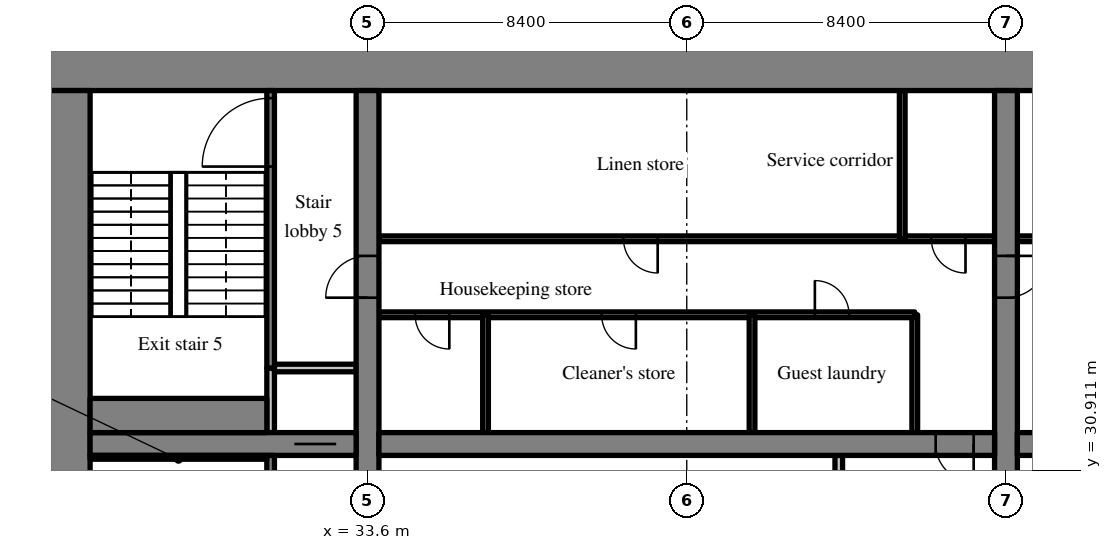
"""IFC4 building model, lengths in metres.
Left out: names, types, materials, properties, quantities, classifications, styles, units other than length and angle.
Written with IfcOpenShell. Run it as: python <this file> out.ifc"""

import sys

from ifc_helpers import new_model, si_unit, direction, frame, frame_2d, origin, place, context, subcontext, project, spatial, rectangle, extrude, source, transform, mapped, element, fill, save


model = new_model("IFC4")
c1 = context("Model", 3, precision=1e-05, world=origin(), true_north=direction((0.0, 1.0)))
c2 = subcontext(c1, "Body", "Model", "MODEL_VIEW")
j1 = project(units=[si_unit("LENGTHUNIT", "METRE"), si_unit("PLANEANGLEUNIT", "RADIAN")], contexts=[c1])
p1 = place(None, origin())
s1 = spatial("IfcSite", under=j1, at=p1, CompositionType="ELEMENT")
p2 = place(p1, origin())
s2 = spatial("IfcBuilding", under=s1, at=p2, CompositionType="ELEMENT")
p3 = place(p2, frame((0.0, 0.0, 39.2)))
s3 = spatial("IfcBuildingStorey", under=s2, at=p3, CompositionType="ELEMENT", Elevation=39.2)
m1 = source(origin(), c2, "Body", "SweptSolid", [
    extrude(rectangle(XDim=50.4, YDim=1.1, at=frame_2d((25.2, 0.0))), origin(), (0.0, 0.0, 1.0), 3.52),
])
p4 = place(p3, frame((25.2, 41.45, 0.0), z_axis=(0.0, 0.0, 1.0), x_axis=(1.0, 0.0, 0.0)))
e1 = element("IfcWall", 1, at=p4, inside=s3, PredefinedType="SHEAR", context=c2, shape_type="MappedRepresentation", body=[
    mapped(m1, transform((0.0, 0.0, 0.0), scale=1.0)),
])
m2 = source(origin(), c2, "Body", "SweptSolid", [
    extrude(rectangle(XDim=17.8, YDim=1.1, at=frame_2d((8.9, 0.0))), origin(), (0.0, 0.0, 1.0), 3.52),
])
p5 = place(p3, frame((25.75, 23.1, 0.0), z_axis=(0.0, 0.0, 1.0), x_axis=(0.0, 1.0, 0.0)))
e2 = element("IfcWall", 2, at=p5, inside=s3, PredefinedType="SHEAR", context=c2, shape_type="MappedRepresentation", body=[
    mapped(m2, transform((0.0, 0.0, 0.0), scale=1.0)),
])
m3 = source(origin(), c2, "Body", "SweptSolid", [
    extrude(rectangle(XDim=17.8, YDim=0.6, at=frame_2d((8.9, 0.0))), origin(), (0.0, 0.0, 1.0), 3.52),
])
p6 = place(p3, frame((33.6, 23.1, 0.0), z_axis=(0.0, 0.0, 1.0), x_axis=(0.0, 1.0, 0.0)))
e3 = element("IfcWall", 3, at=p6, inside=s3, PredefinedType="SHEAR", context=c2, shape_type="MappedRepresentation", body=[
    mapped(m3, transform((0.0, 0.0, 0.0), scale=1.0)),
])
m4 = source(origin(), c2, "Body", "SweptSolid", [
    extrude(rectangle(XDim=1.1, YDim=2.1, at=frame_2d((0.55, 1.05))), frame((0.0, 0.31, 0.0), z_axis=(0.0, -1.0, 0.0), x_axis=(1.0, 0.0, 0.0)), (0.0, 0.0, 1.0), 0.62),
])
p7 = place(p6, frame((12.35, 0.0, 0.0)))
e4 = element("IfcOpeningElement", 4, at=p7, cuts=e3, PredefinedType="OPENING", context=c2, shape_type="MappedRepresentation", body=[
    mapped(m4, transform((0.0, 0.0, 0.0), scale=1.0)),
])
p8 = place(p3, frame((50.4, 23.1, 0.0), z_axis=(0.0, 0.0, 1.0), x_axis=(0.0, 1.0, 0.0)))
e5 = element("IfcWall", 5, at=p8, inside=s3, PredefinedType="SHEAR", context=c2, shape_type="MappedRepresentation", body=[
    mapped(m3, transform((0.0, 0.0, 0.0), scale=1.0)),
])
p9 = place(p8, frame((12.35, 0.0, 0.0)))
e6 = element("IfcOpeningElement", 6, at=p9, cuts=e5, PredefinedType="OPENING", context=c2, shape_type="MappedRepresentation", body=[
    mapped(m4, transform((0.0, 0.0, 0.0), scale=1.0)),
])
m5 = source(origin(), c2, "Body", "SweptSolid", [
    extrude(rectangle(XDim=7.0, YDim=0.6, at=frame_2d((3.5, 0.0))), origin(), (0.0, 0.0, 1.0), 3.52),
])
p10 = place(p3, frame((26.3, 31.6, 0.0), z_axis=(0.0, 0.0, 1.0), x_axis=(1.0, 0.0, 0.0)))
e7 = element("IfcWall", 7, at=p10, inside=s3, PredefinedType="SHEAR", context=c2, shape_type="MappedRepresentation", body=[
    mapped(m5, transform((0.0, 0.0, 0.0), scale=1.0)),
])
p11 = place(p10, frame((5.375, 0.0, 0.0)))
e8 = element("IfcOpeningElement", 8, at=p11, cuts=e7, PredefinedType="OPENING", context=c2, shape_type="MappedRepresentation", body=[
    mapped(m4, transform((0.0, 0.0, 0.0), scale=1.0)),
])
m6 = source(origin(), c2, "Body", "SweptSolid", [
    extrude(rectangle(XDim=16.2, YDim=0.6, at=frame_2d((8.1, 0.0))), origin(), (0.0, 0.0, 1.0), 3.52),
])
p12 = place(p3, frame((33.9, 31.6, 0.0), z_axis=(0.0, 0.0, 1.0), x_axis=(1.0, 0.0, 0.0)))
e9 = element("IfcWall", 9, at=p12, inside=s3, PredefinedType="SHEAR", context=c2, shape_type="MappedRepresentation", body=[
    mapped(m6, transform((0.0, 0.0, 0.0), scale=1.0)),
])
m7 = source(origin(), c2, "Body", "SweptSolid", [
    extrude(rectangle(XDim=1.0, YDim=2.1, at=frame_2d((0.5, 1.05))), frame((0.0, 0.31, 0.0), z_axis=(0.0, -1.0, 0.0), x_axis=(1.0, 0.0, 0.0)), (0.0, 0.0, 1.0), 0.62),
])
p13 = place(p12, frame((14.65, 0.0, 0.0)))
e10 = element("IfcOpeningElement", 10, at=p13, cuts=e9, PredefinedType="OPENING", context=c2, shape_type="MappedRepresentation", body=[
    mapped(m7, transform((0.0, 0.0, 0.0), scale=1.0)),
])
m8 = source(origin(), c2, "Body", "SweptSolid", [
    extrude(rectangle(XDim=16.2, YDim=0.6, at=frame_2d((8.1, 0.0))), origin(), (0.0, 0.0, 1.0), 3.52),
])
p14 = place(p3, frame((50.7, 31.6, 0.0), z_axis=(0.0, 0.0, 1.0), x_axis=(1.0, 0.0, 0.0)))
e11 = element("IfcWall", 11, at=p14, inside=s3, PredefinedType="SHEAR", context=c2, shape_type="MappedRepresentation", body=[
    mapped(m8, transform((0.0, 0.0, 0.0), scale=1.0)),
])
p15 = place(p14, frame((0.55, 0.0, 0.0)))
e12 = element("IfcOpeningElement", 12, at=p15, cuts=e11, PredefinedType="OPENING", context=c2, shape_type="MappedRepresentation", body=[
    mapped(m7, transform((0.0, 0.0, 0.0), scale=1.0)),
])
m9 = source(origin(), c2, "Body", "SweptSolid", [
    extrude(rectangle(XDim=3.559, YDim=0.3, at=frame_2d((1.78, 0.0))), origin(), (0.0, 0.0, 1.0), 3.52),
])
p16 = place(p3, frame((25.55, 39.969, 0.0), z_axis=(0.0, 0.0, 1.0), x_axis=(-0.35779745313, 0.933799219604, 0.0)))
e13 = element("IfcWall", 13, at=p16, inside=s3, PredefinedType="SOLIDWALL", context=c2, shape_type="MappedRepresentation", body=[
    mapped(m9, transform((0.0, 0.0, 0.0), scale=1.0)),
])
m10 = source(origin(), c2, "Body", "SweptSolid", [
    extrude(rectangle(XDim=1.5, YDim=2.0, at=frame_2d((0.75, 1.0))), frame((0.0, 0.16, 0.0), z_axis=(0.0, -1.0, 0.0), x_axis=(1.0, 0.0, 0.0)), (0.0, 0.0, 1.0), 0.32),
])
p17 = place(p16, frame((1.903, 0.0, 0.9)))
e14 = element("IfcOpeningElement", 14, at=p17, cuts=e13, PredefinedType="OPENING", context=c2, shape_type="MappedRepresentation", body=[
    mapped(m10, transform((0.0, 0.0, 0.0), scale=1.0)),
])
m11 = source(origin(), c2, "Body", "SweptSolid", [
    extrude(rectangle(XDim=2.5, YDim=0.2, at=frame_2d((1.25, 0.0))), origin(), (0.0, 0.0, 1.0), 3.52),
])
p18 = place(p3, frame((46.0, 28.8, 0.0), z_axis=(0.0, 0.0, 1.0), x_axis=(0.0, 1.0, 0.0)))
e15 = element("IfcWall", 15, at=p18, inside=s3, PredefinedType="SOLIDWALL", context=c2, shape_type="MappedRepresentation", body=[
    mapped(m11, transform((0.0, 0.0, 0.0), scale=1.0)),
])
m12 = source(origin(), c2, "Body", "SweptSolid", [
    extrude(rectangle(XDim=3.1, YDim=0.15, at=frame_2d((1.55, 0.0))), origin(), (0.0, 0.0, 1.0), 3.52),
])
p19 = place(p3, frame((48.0, 31.9, 0.0), z_axis=(0.0, 0.0, 1.0), x_axis=(0.0, 1.0, 0.0)))
e16 = element("IfcWall", 16, at=p19, inside=s3, PredefinedType="PARTITIONING", context=c2, shape_type="MappedRepresentation", body=[
    mapped(m12, transform((0.0, 0.0, 0.0), scale=1.0)),
])
m13 = source(origin(), c2, "Body", "SweptSolid", [
    extrude(rectangle(XDim=14.1, YDim=0.15, at=frame_2d((7.05, 0.0))), origin(), (0.0, 0.0, 1.0), 3.52),
])
p20 = place(p3, frame((33.9, 35.0, 0.0), z_axis=(0.0, 0.0, 1.0), x_axis=(1.0, 0.0, 0.0)))
e17 = element("IfcWall", 17, at=p20, inside=s3, PredefinedType="PARTITIONING", context=c2, shape_type="MappedRepresentation", body=[
    mapped(m13, transform((0.0, 0.0, 0.0), scale=1.0)),
])
m14 = source(origin(), c2, "Body", "SweptSolid", [
    extrude(rectangle(XDim=0.9, YDim=2.1, at=frame_2d((0.45, 1.05))), frame((0.0, 0.085, 0.0), z_axis=(0.0, -1.0, 0.0), x_axis=(1.0, 0.0, 0.0)), (0.0, 0.0, 1.0), 0.17),
])
p21 = place(p20, frame((0.952, 0.0, 0.0)))
e18 = element("IfcOpeningElement", 18, at=p21, cuts=e17, PredefinedType="OPENING", context=c2, shape_type="MappedRepresentation", body=[
    mapped(m14, transform((0.0, 0.0, 0.0), scale=1.0)),
])
p22 = place(p20, frame((5.861, 0.0, 0.0)))
e19 = element("IfcOpeningElement", 19, at=p22, cuts=e17, PredefinedType="OPENING", context=c2, shape_type="MappedRepresentation", body=[
    mapped(m14, transform((0.0, 0.0, 0.0), scale=1.0)),
])
p23 = place(p20, frame((11.471, 0.0, 0.0)))
e20 = element("IfcOpeningElement", 20, at=p23, cuts=e17, PredefinedType="OPENING", context=c2, shape_type="MappedRepresentation", body=[
    mapped(m14, transform((0.0, 0.0, 0.0), scale=1.0)),
])
m15 = source(origin(), c2, "Body", "SweptSolid", [
    extrude(rectangle(XDim=16.2, YDim=0.15, at=frame_2d((8.1, 0.0))), origin(), (0.0, 0.0, 1.0), 3.52),
])
p24 = place(p3, frame((33.9, 37.0, 0.0), z_axis=(0.0, 0.0, 1.0), x_axis=(1.0, 0.0, 0.0)))
e21 = element("IfcWall", 21, at=p24, inside=s3, PredefinedType="PARTITIONING", context=c2, shape_type="MappedRepresentation", body=[
    mapped(m15, transform((0.0, 0.0, 0.0), scale=1.0)),
])
p25 = place(p24, frame((6.435, 0.0, 0.0)))
e22 = element("IfcOpeningElement", 22, at=p25, cuts=e21, PredefinedType="OPENING", context=c2, shape_type="MappedRepresentation", body=[
    mapped(m14, transform((0.0, 0.0, 0.0), scale=1.0)),
])
p26 = place(p24, frame((14.535, 0.0, 0.0)))
e23 = element("IfcOpeningElement", 23, at=p26, cuts=e21, PredefinedType="OPENING", context=c2, shape_type="MappedRepresentation", body=[
    mapped(m14, transform((0.0, 0.0, 0.0), scale=1.0)),
])
for number, where, z_axis, x_axis in (
    (24, (36.705, 31.9, 0.0), (0.0, 0.0, 1.0), (0.0, 1.0, 0.0)),
    (25, (43.718, 31.9, 0.0), (0.0, 0.0, 1.0), (0.0, 1.0, 0.0)),
):
    element("IfcWall", number, at=place(p3, frame(where, z_axis=z_axis, x_axis=x_axis)), inside=s3, PredefinedType="PARTITIONING", context=c2, shape_type="MappedRepresentation", body=[
        mapped(m12, transform((0.0, 0.0, 0.0), scale=1.0)),
    ])
m16 = source(origin(), c2, "Body", "SweptSolid", [
    extrude(rectangle(XDim=3.9, YDim=0.15, at=frame_2d((1.95, 0.0))), origin(), (0.0, 0.0, 1.0), 3.52),
])
p27 = place(p3, frame((47.67, 37.0, 0.0), z_axis=(0.0, 0.0, 1.0), x_axis=(0.0, 1.0, 0.0)))
e26 = element("IfcWall", 26, at=p27, inside=s3, PredefinedType="PARTITIONING", context=c2, shape_type="MappedRepresentation", body=[
    mapped(m16, transform((0.0, 0.0, 0.0), scale=1.0)),
])
m17 = source(origin(), c2, "Body", "SweptSolid", [
    extrude(rectangle(XDim=16.2, YDim=0.15, at=frame_2d((8.1, 0.0))), origin(), (0.0, 0.0, 1.0), 3.52),
])
p28 = place(p3, frame((66.9, 37.0, 0.0), z_axis=(0.0, 0.0, 1.0), x_axis=(-1.0, 0.0, 0.0)))
e27 = element("IfcWall", 27, at=p28, inside=s3, PredefinedType="PARTITIONING", context=c2, shape_type="MappedRepresentation", body=[
    mapped(m17, transform((0.0, 0.0, 0.0), scale=1.0)),
])
p29 = place(p28, frame((1.575, 0.0, 0.0)))
e28 = element("IfcOpeningElement", 28, at=p29, cuts=e27, PredefinedType="OPENING", context=c2, shape_type="MappedRepresentation", body=[
    mapped(m14, transform((0.0, 0.0, 0.0), scale=1.0)),
])
p30 = place(p28, frame((7.245, 0.0, 0.0)))
e29 = element("IfcOpeningElement", 29, at=p30, cuts=e27, PredefinedType="OPENING", context=c2, shape_type="MappedRepresentation", body=[
    mapped(m14, transform((0.0, 0.0, 0.0), scale=1.0)),
])
p31 = place(p28, frame((12.105, 0.0, 0.0)))
e30 = element("IfcOpeningElement", 30, at=p31, cuts=e27, PredefinedType="OPENING", context=c2, shape_type="MappedRepresentation", body=[
    mapped(m14, transform((0.0, 0.0, 0.0), scale=1.0)),
])
p32 = place(p28, frame((14.535, 0.0, 0.0)))
e31 = element("IfcOpeningElement", 31, at=p32, cuts=e27, PredefinedType="OPENING", context=c2, shape_type="MappedRepresentation", body=[
    mapped(m14, transform((0.0, 0.0, 0.0), scale=1.0)),
])
m18 = source(origin(), c2, "Body", "SweptSolid", [
    extrude(rectangle(XDim=8.2, YDim=0.2, at=frame_2d((4.1, 0.0))), origin(), (0.0, 0.0, 1.0), 3.52),
])
p33 = place(p3, frame((31.05, 23.1, 0.0), z_axis=(0.0, 0.0, 1.0), x_axis=(0.0, 1.0, 0.0)))
e32 = element("IfcWall", 32, at=p33, inside=s3, PredefinedType="SOLIDWALL", context=c2, shape_type="MappedRepresentation", body=[
    mapped(m18, transform((0.0, 0.0, 0.0), scale=1.0)),
])
m19 = source(origin(), c2, "Body", "SweptSolid", [
    extrude(rectangle(XDim=1.2, YDim=2.1, at=frame_2d((0.6, 1.05))), frame((0.0, 0.11, 0.0), z_axis=(0.0, -1.0, 0.0), x_axis=(1.0, 0.0, 0.0)), (0.0, 0.0, 1.0), 0.22),
])
p34 = place(p33, frame((6.4, 0.0, 0.0)))
e33 = element("IfcOpeningElement", 33, at=p34, cuts=e32, PredefinedType="OPENING", context=c2, shape_type="MappedRepresentation", body=[
    mapped(m19, transform((0.0, 0.0, 0.0), scale=1.0)),
])
m20 = source(origin(), c2, "Body", "SweptSolid", [
    extrude(rectangle(XDim=1.7, YDim=0.2, at=frame_2d((0.85, 0.0))), origin(), (0.0, 0.0, 1.0), 3.52),
])
p35 = place(p3, frame((31.05, 31.9, 0.0), z_axis=(0.0, 0.0, 1.0), x_axis=(0.0, 1.0, 0.0)))
e34 = element("IfcWall", 34, at=p35, inside=s3, PredefinedType="SOLIDWALL", context=c2, shape_type="MappedRepresentation", body=[
    mapped(m20, transform((0.0, 0.0, 0.0), scale=1.0)),
])
m21 = source(origin(), c2, "Body", "SweptSolid", [
    extrude(rectangle(XDim=2.15, YDim=0.2, at=frame_2d((1.075, 0.0))), origin(), (0.0, 0.0, 1.0), 3.52),
])
p36 = place(p3, frame((31.15, 33.6, 0.0), z_axis=(0.0, 0.0, 1.0), x_axis=(1.0, 0.0, 0.0)))
e35 = element("IfcWall", 35, at=p36, inside=s3, PredefinedType="SOLIDWALL", context=c2, shape_type="MappedRepresentation", body=[
    mapped(m21, transform((0.0, 0.0, 0.0), scale=1.0)),
])
m22 = source(origin(), c2, "Body", "SweptSolid", [
    extrude(rectangle(XDim=7.3, YDim=0.2, at=frame_2d((3.65, 0.0))), origin(), (0.0, 0.0, 1.0), 3.52),
])
p37 = place(p3, frame((31.05, 33.6, 0.0), z_axis=(0.0, 0.0, 1.0), x_axis=(0.0, 1.0, 0.0)))
e36 = element("IfcWall", 36, at=p37, inside=s3, PredefinedType="SOLIDWALL", context=c2, shape_type="MappedRepresentation", body=[
    mapped(m22, transform((0.0, 0.0, 0.0), scale=1.0)),
])
m23 = source(origin(), c2, "Body", "SweptSolid", [
    extrude(rectangle(XDim=1.8, YDim=2.1, at=frame_2d((0.9, 1.05))), frame((0.0, 0.11, 0.0), z_axis=(0.0, -1.0, 0.0), x_axis=(1.0, 0.0, 0.0)), (0.0, 0.0, 1.0), 0.22),
])
p38 = place(p37, frame((5.3, 0.0, 0.0)))
e37 = element("IfcOpeningElement", 37, at=p38, cuts=e36, PredefinedType="OPENING", context=c2, shape_type="MappedRepresentation", body=[
    mapped(m23, transform((0.0, 0.0, 0.0), scale=1.0)),
])
m24 = source(origin(), c2, "Body", "SweptSolid", [
    extrude(rectangle(XDim=4.65, YDim=0.1, at=frame_2d((2.325, 0.0))), origin(), (0.0, 0.0, 1.0), 3.52),
])
p39 = place(p3, frame((26.3, 31.25, 0.0), z_axis=(0.0, 0.0, 1.0), x_axis=(1.0, 0.0, 0.0)))
e38 = element("IfcWall", 38, at=p39, inside=s3, PredefinedType="SOLIDWALL", context=c2, shape_type="MappedRepresentation", body=[
    mapped(m24, transform((0.0, 0.0, 0.0), scale=1.0)),
])
m25 = source(origin(), c2, "Body", "SweptSolid", [
    extrude(rectangle(XDim=4.65, YDim=0.9, at=frame_2d((2.325, 0.0))), origin(), (0.0, 0.0, 1.0), 3.52),
])
p40 = place(p3, frame((26.3, 32.35, 0.0), z_axis=(0.0, 0.0, 1.0), x_axis=(1.0, 0.0, 0.0)))
e39 = element("IfcWall", 39, at=p40, inside=s3, PredefinedType="SOLIDWALL", context=c2, shape_type="MappedRepresentation", body=[
    mapped(m25, transform((0.0, 0.0, 0.0), scale=1.0)),
])
m26 = source(origin(), c2, "Body", "SweptSolid", [
    extrude(rectangle(XDim=1.0, YDim=2.1, at=frame_2d((0.5, 1.05))), frame((0.0, 0.025, 0.0), z_axis=(0.0, -1.0, 0.0), x_axis=(1.0, 0.0, 0.0)), (0.0, 0.0, 1.0), 0.05),
])
p41 = place(p13, origin())
e40 = element("IfcDoor", 40, at=p41, inside=s3, OperationType="SINGLE_SWING_RIGHT", PredefinedType="DOOR", context=c2, shape_type="MappedRepresentation", body=[
    mapped(m26, transform((0.0, 0.0, 0.0), scale=1.0)),
])
fill(e10, e40)
m27 = source(origin(), c2, "Body", "SweptSolid", [
    extrude(rectangle(XDim=0.9, YDim=2.1, at=frame_2d((0.45, 1.05))), frame((0.0, 0.025, 0.0), z_axis=(0.0, -1.0, 0.0), x_axis=(1.0, 0.0, 0.0)), (0.0, 0.0, 1.0), 0.05),
])
p42 = place(p21, origin())
e41 = element("IfcDoor", 41, at=p42, inside=s3, OperationType="SINGLE_SWING_RIGHT", PredefinedType="DOOR", context=c2, shape_type="MappedRepresentation", body=[
    mapped(m27, transform((0.0, 0.0, 0.0), scale=1.0)),
])
fill(e18, e41)
p43 = place(p22, origin())
e42 = element("IfcDoor", 42, at=p43, inside=s3, OperationType="SINGLE_SWING_RIGHT", PredefinedType="DOOR", context=c2, shape_type="MappedRepresentation", body=[
    mapped(m27, transform((0.0, 0.0, 0.0), scale=1.0)),
])
fill(e19, e42)
p44 = place(p23, origin())
e43 = element("IfcDoor", 43, at=p44, inside=s3, OperationType="SINGLE_SWING_LEFT", PredefinedType="DOOR", context=c2, shape_type="MappedRepresentation", body=[
    mapped(m27, transform((0.0, 0.0, 0.0), scale=1.0)),
])
fill(e20, e43)
p45 = place(p25, origin())
e44 = element("IfcDoor", 44, at=p45, inside=s3, OperationType="SINGLE_SWING_RIGHT", PredefinedType="DOOR", context=c2, shape_type="MappedRepresentation", body=[
    mapped(m27, transform((0.0, 0.0, 0.0), scale=1.0)),
])
fill(e22, e44)
p46 = place(p26, origin())
e45 = element("IfcDoor", 45, at=p46, inside=s3, OperationType="SINGLE_SWING_RIGHT", PredefinedType="DOOR", context=c2, shape_type="MappedRepresentation", body=[
    mapped(m27, transform((0.0, 0.0, 0.0), scale=1.0)),
])
fill(e23, e45)
m28 = source(origin(), c2, "Body", "SweptSolid", [
    extrude(rectangle(XDim=1.1, YDim=2.1, at=frame_2d((0.55, 1.05))), frame((0.0, 0.025, 0.0), z_axis=(0.0, -1.0, 0.0), x_axis=(1.0, 0.0, 0.0)), (0.0, 0.0, 1.0), 0.05),
])
p47 = place(p11, origin())
e46 = element("IfcDoor", 46, at=p47, inside=s3, OperationType="SLIDING_TO_RIGHT", PredefinedType="DOOR", context=c2, shape_type="MappedRepresentation", body=[
    mapped(m28, transform((0.0, 0.0, 0.0), scale=1.0)),
])
fill(e8, e46)
m29 = source(origin(), c2, "Body", "SweptSolid", [
    extrude(rectangle(XDim=1.8, YDim=2.1, at=frame_2d((0.9, 1.05))), frame((0.0, 0.025, 0.0), z_axis=(0.0, -1.0, 0.0), x_axis=(1.0, 0.0, 0.0)), (0.0, 0.0, 1.0), 0.05),
])
p48 = place(p38, origin())
e47 = element("IfcDoor", 47, at=p48, inside=s3, OperationType="SINGLE_SWING_LEFT", PredefinedType="DOOR", context=c2, shape_type="MappedRepresentation", body=[
    mapped(m29, transform((0.0, 0.0, 0.0), scale=1.0)),
])
fill(e37, e47)
p49 = place(p7, origin())
e48 = element("IfcDoor", 48, at=p49, inside=s3, OperationType="SINGLE_SWING_LEFT", PredefinedType="DOOR", context=c2, shape_type="MappedRepresentation", body=[
    mapped(m28, transform((0.0, 0.0, 0.0), scale=1.0)),
])
fill(e4, e48)
p50 = place(p9, origin())
e49 = element("IfcDoor", 49, at=p50, inside=s3, OperationType="SINGLE_SWING_RIGHT", PredefinedType="DOOR", context=c2, shape_type="MappedRepresentation", body=[
    mapped(m28, transform((0.0, 0.0, 0.0), scale=1.0)),
])
fill(e6, e49)
save(model, sys.argv[1])
